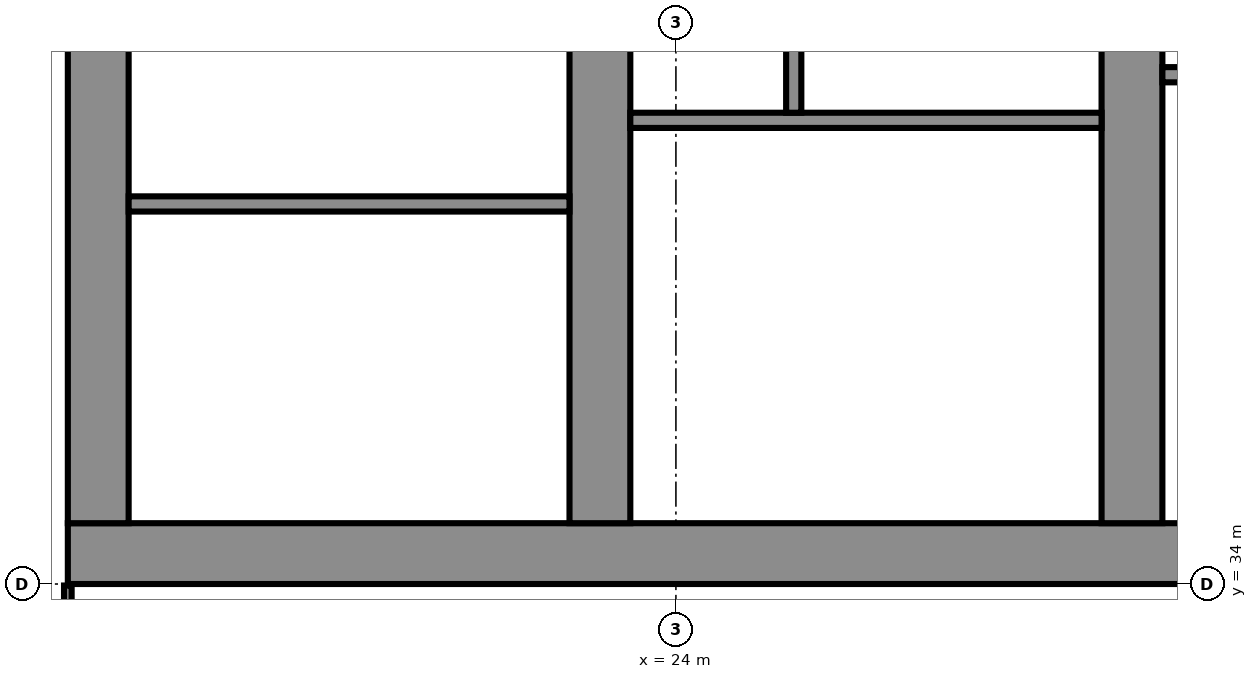
"""IFC4 building model, lengths in metres.
Left out: names, types, materials, properties, quantities, classifications, styles, units other than length and angle.
Written with IfcOpenShell. Run it as: python <this file> out.ifc"""

import sys

from ifc_helpers import new_model, si_unit, direction, frame, frame_2d, origin, place, context, subcontext, project, spatial, polyline, rectangle, outline, extrude, element, fill, save


model = new_model("IFC4")
c1 = context("Model", 3, precision=1e-05, world=origin(), true_north=direction((0.0, 1.0)))
c2 = subcontext(c1, "Body", "Model", "MODEL_VIEW")
j1 = project(units=[si_unit("LENGTHUNIT", "METRE"), si_unit("PLANEANGLEUNIT", "RADIAN")], contexts=[c1])
p1 = place(None, origin())
s1 = spatial("IfcSite", under=j1, at=p1, CompositionType="ELEMENT")
p2 = place(p1, origin())
s2 = spatial("IfcBuilding", under=s1, at=p2, CompositionType="ELEMENT")
p3 = place(p2, frame((0.0, 0.0, 151.9)))
s3 = spatial("IfcBuildingStorey", under=s2, at=p3, CompositionType="ELEMENT", Elevation=151.9)
p4 = place(p3, frame((16.0, 34.4, 0.0), z_axis=(0.0, 0.0, 1.0), x_axis=(1.0, 0.0, 0.0)))
e1 = element("IfcWall", 1, at=p4, inside=s3, PredefinedType="SHEAR", context=c2, shape_type="SweptSolid", body=[
    extrude(rectangle(XDim=42.0, YDim=0.8, at=frame_2d((21.0, 0.0))), origin(), (0.0, 0.0, 1.0), 3.6),
])
p5 = place(p4, frame((3.2, 0.0, 0.0)))
e2 = element("IfcOpeningElement", 2, at=p5, cuts=e1, PredefinedType="OPENING", context=c2, shape_type="SweptSolid", body=[
    extrude(rectangle(XDim=1.0, YDim=2.1, at=frame_2d((0.5, 1.05))), frame((0.0, 0.41, 0.0), z_axis=(0.0, -1.0, 0.0), x_axis=(1.0, 0.0, 0.0)), (0.0, 0.0, 1.0), 0.82),
])
p6 = place(p4, frame((7.65, 0.0, 0.0)))
e3 = element("IfcOpeningElement", 3, at=p6, cuts=e1, PredefinedType="OPENING", context=c2, shape_type="SweptSolid", body=[
    extrude(rectangle(XDim=1.2, YDim=2.1, at=frame_2d((0.6, 1.05))), frame((0.0, 0.41, 0.0), z_axis=(0.0, -1.0, 0.0), x_axis=(1.0, 0.0, 0.0)), (0.0, 0.0, 1.0), 0.82),
])
p7 = place(p4, frame((14.767, 0.0, 0.0)))
e4 = element("IfcOpeningElement", 4, at=p7, cuts=e1, PredefinedType="OPENING", context=c2, shape_type="SweptSolid", body=[
    extrude(rectangle(XDim=1.1, YDim=2.1, at=frame_2d((0.55, 1.05))), frame((0.0, 0.41, 0.0), z_axis=(0.0, -1.0, 0.0), x_axis=(1.0, 0.0, 0.0)), (0.0, 0.0, 1.0), 0.82),
])
p8 = place(p4, frame((19.133, 0.0, 0.0)))
e5 = element("IfcOpeningElement", 5, at=p8, cuts=e1, PredefinedType="OPENING", context=c2, shape_type="SweptSolid", body=[
    extrude(rectangle(XDim=1.1, YDim=2.1, at=frame_2d((0.55, 1.05))), frame((0.0, 0.41, 0.0), z_axis=(0.0, -1.0, 0.0), x_axis=(1.0, 0.0, 0.0)), (0.0, 0.0, 1.0), 0.82),
])
p9 = place(p4, frame((16.8, 0.0, 0.0)))
e6 = element("IfcOpeningElement", 6, at=p9, cuts=e1, PredefinedType="OPENING", context=c2, shape_type="SweptSolid", body=[
    extrude(rectangle(XDim=1.4, YDim=2.1, at=frame_2d((0.7, 1.05))), frame((0.0, 0.41, 0.0), z_axis=(0.0, -1.0, 0.0), x_axis=(1.0, 0.0, 0.0)), (0.0, 0.0, 1.0), 0.82),
])
p10 = place(p4, frame((21.767, 0.0, 0.0)))
e7 = element("IfcOpeningElement", 7, at=p10, cuts=e1, PredefinedType="OPENING", context=c2, shape_type="SweptSolid", body=[
    extrude(rectangle(XDim=1.1, YDim=2.1, at=frame_2d((0.55, 1.05))), frame((0.0, 0.41, 0.0), z_axis=(0.0, -1.0, 0.0), x_axis=(1.0, 0.0, 0.0)), (0.0, 0.0, 1.0), 0.82),
])
p11 = place(p4, frame((23.95, 0.0, 0.0)))
e8 = element("IfcOpeningElement", 8, at=p11, cuts=e1, PredefinedType="OPENING", context=c2, shape_type="SweptSolid", body=[
    extrude(rectangle(XDim=1.1, YDim=2.1, at=frame_2d((0.55, 1.05))), frame((0.0, 0.41, 0.0), z_axis=(0.0, -1.0, 0.0), x_axis=(1.0, 0.0, 0.0)), (0.0, 0.0, 1.0), 0.82),
])
p12 = place(p4, frame((26.133, 0.0, 0.0)))
e9 = element("IfcOpeningElement", 9, at=p12, cuts=e1, PredefinedType="OPENING", context=c2, shape_type="SweptSolid", body=[
    extrude(rectangle(XDim=1.1, YDim=2.1, at=frame_2d((0.55, 1.05))), frame((0.0, 0.41, 0.0), z_axis=(0.0, -1.0, 0.0), x_axis=(1.0, 0.0, 0.0)), (0.0, 0.0, 1.0), 0.82),
])
p13 = place(p4, frame((33.15, 0.0, 0.0)))
e10 = element("IfcOpeningElement", 10, at=p13, cuts=e1, PredefinedType="OPENING", context=c2, shape_type="SweptSolid", body=[
    extrude(rectangle(XDim=1.2, YDim=2.1, at=frame_2d((0.6, 1.05))), frame((0.0, 0.41, 0.0), z_axis=(0.0, -1.0, 0.0), x_axis=(1.0, 0.0, 0.0)), (0.0, 0.0, 1.0), 0.82),
])
p14 = place(p4, frame((35.817, 0.0, 0.0)))
e11 = element("IfcOpeningElement", 11, at=p14, cuts=e1, PredefinedType="OPENING", context=c2, shape_type="SweptSolid", body=[
    extrude(rectangle(XDim=1.0, YDim=2.1, at=frame_2d((0.5, 1.05))), frame((0.0, 0.41, 0.0), z_axis=(0.0, -1.0, 0.0), x_axis=(1.0, 0.0, 0.0)), (0.0, 0.0, 1.0), 0.82),
])
p15 = place(p4, frame((39.95, 0.0, 0.0)))
e12 = element("IfcOpeningElement", 12, at=p15, cuts=e1, PredefinedType="OPENING", context=c2, shape_type="SweptSolid", body=[
    extrude(rectangle(XDim=1.0, YDim=2.1, at=frame_2d((0.5, 1.05))), frame((0.0, 0.41, 0.0), z_axis=(0.0, -1.0, 0.0), x_axis=(1.0, 0.0, 0.0)), (0.0, 0.0, 1.0), 0.82),
])
p16 = place(p4, frame((37.767, 0.0, 0.0)))
e13 = element("IfcOpeningElement", 13, at=p16, cuts=e1, PredefinedType="OPENING", context=c2, shape_type="SweptSolid", body=[
    extrude(rectangle(XDim=1.4, YDim=2.1, at=frame_2d((0.7, 1.05))), frame((0.0, 0.41, 0.0), z_axis=(0.0, -1.0, 0.0), x_axis=(1.0, 0.0, 0.0)), (0.0, 0.0, 1.0), 0.82),
])
p17 = place(p3, frame((16.4, 34.8, 0.0), z_axis=(0.0, 0.0, 1.0), x_axis=(0.0, 1.0, 0.0)))
e14 = element("IfcWall", 14, at=p17, inside=s3, PredefinedType="SHEAR", context=c2, shape_type="SweptSolid", body=[
    extrude(rectangle(XDim=13.184, YDim=0.8, at=frame_2d((6.592, 0.0))), origin(), (0.0, 0.0, 1.0), 3.6),
])
p18 = place(p3, frame((23.0, 34.8, 0.0), z_axis=(0.0, 0.0, 1.0), x_axis=(0.0, 1.0, 0.0)))
e15 = element("IfcWall", 15, at=p18, inside=s3, PredefinedType="SHEAR", context=c2, shape_type="SweptSolid", body=[
    extrude(rectangle(XDim=13.762, YDim=0.8, at=frame_2d((6.881, 0.0))), origin(), (0.0, 0.0, 1.0), 3.6),
])
p19 = place(p18, frame((2.55, 0.0, 0.0)))
e16 = element("IfcOpeningElement", 16, at=p19, cuts=e15, PredefinedType="OPENING", context=c2, shape_type="SweptSolid", body=[
    extrude(rectangle(XDim=1.1, YDim=2.1, at=frame_2d((0.55, 1.05))), frame((0.0, 0.41, 0.0), z_axis=(0.0, -1.0, 0.0), x_axis=(1.0, 0.0, 0.0)), (0.0, 0.0, 1.0), 0.82),
])
p20 = place(p18, frame((10.0, 0.0, 0.0)))
e17 = element("IfcOpeningElement", 17, at=p20, cuts=e15, PredefinedType="OPENING", context=c2, shape_type="SweptSolid", body=[
    extrude(rectangle(XDim=1.0, YDim=2.1, at=frame_2d((0.5, 1.05))), frame((0.0, 0.41, 0.0), z_axis=(0.0, -1.0, 0.0), x_axis=(1.0, 0.0, 0.0)), (0.0, 0.0, 1.0), 0.82),
])
p21 = place(p3, frame((30.0, 34.8, 0.0), z_axis=(0.0, 0.0, 1.0), x_axis=(0.0, 1.0, 0.0)))
e18 = element("IfcWall", 18, at=p21, inside=s3, PredefinedType="SHEAR", context=c2, shape_type="SweptSolid", body=[
    extrude(rectangle(XDim=14.374, YDim=0.8, at=frame_2d((7.187, 0.0))), origin(), (0.0, 0.0, 1.0), 3.6),
])
p22 = place(p21, frame((3.6, 0.0, 0.0)))
e19 = element("IfcOpeningElement", 19, at=p22, cuts=e18, PredefinedType="OPENING", context=c2, shape_type="SweptSolid", body=[
    extrude(rectangle(XDim=1.1, YDim=2.1, at=frame_2d((0.55, 1.05))), frame((0.0, 0.41, 0.0), z_axis=(0.0, -1.0, 0.0), x_axis=(1.0, 0.0, 0.0)), (0.0, 0.0, 1.0), 0.82),
])
p23 = place(p3, frame((16.8, 39.0, 0.0), z_axis=(0.0, 0.0, 1.0), x_axis=(1.0, 0.0, 0.0)))
e20 = element("IfcWall", 20, at=p23, inside=s3, PredefinedType="PARTITIONING", context=c2, shape_type="SweptSolid", body=[
    extrude(rectangle(XDim=5.8, YDim=0.2, at=frame_2d((2.9, 0.0))), origin(), (0.0, 0.0, 1.0), 3.2),
])
p24 = place(p23, frame((2.4, 0.0, 0.0)))
e21 = element("IfcOpeningElement", 21, at=p24, cuts=e20, PredefinedType="OPENING", context=c2, shape_type="SweptSolid", body=[
    extrude(rectangle(XDim=1.0, YDim=2.1, at=frame_2d((0.5, 1.05))), frame((0.0, 0.11, 0.0), z_axis=(0.0, -1.0, 0.0), x_axis=(1.0, 0.0, 0.0)), (0.0, 0.0, 1.0), 0.22),
])
p25 = place(p3, frame((23.4, 40.1, 0.0), z_axis=(0.0, 0.0, 1.0), x_axis=(1.0, 0.0, 0.0)))
e22 = element("IfcWall", 22, at=p25, inside=s3, PredefinedType="SHEAR", context=c2, shape_type="SweptSolid", body=[
    extrude(rectangle(XDim=6.2, YDim=0.2, at=frame_2d((3.1, 0.0))), origin(), (0.0, 0.0, 1.0), 3.2),
])
p26 = place(p25, frame((3.525, 0.0, 0.0)))
e23 = element("IfcOpeningElement", 23, at=p26, cuts=e22, PredefinedType="OPENING", context=c2, shape_type="SweptSolid", body=[
    extrude(rectangle(XDim=1.2, YDim=2.1, at=frame_2d((0.6, 1.05))), frame((0.0, 0.11, 0.0), z_axis=(0.0, -1.0, 0.0), x_axis=(1.0, 0.0, 0.0)), (0.0, 0.0, 1.0), 0.22),
])
p27 = place(p25, frame((0.575, 0.0, 0.0)))
e24 = element("IfcOpeningElement", 24, at=p27, cuts=e22, PredefinedType="OPENING", context=c2, shape_type="SweptSolid", body=[
    extrude(rectangle(XDim=0.9, YDim=2.1, at=frame_2d((0.45, 1.05))), frame((0.0, 0.11, 0.0), z_axis=(0.0, -1.0, 0.0), x_axis=(1.0, 0.0, 0.0)), (0.0, 0.0, 1.0), 0.22),
])
p28 = place(p3, frame((25.55, 40.2, 0.0), z_axis=(0.0, 0.0, 1.0), x_axis=(0.0, 1.0, 0.0)))
e25 = element("IfcWall", 25, at=p28, inside=s3, PredefinedType="SHEAR", context=c2, shape_type="SweptSolid", body=[
    extrude(rectangle(XDim=7.2, YDim=0.2, at=frame_2d((3.6, 0.0))), origin(), (0.0, 0.0, 1.0), 3.2),
])
p29 = place(p3, frame((30.4, 40.7, 0.0), z_axis=(0.0, 0.0, 1.0), x_axis=(1.0, 0.0, 0.0)))
e26 = element("IfcWall", 26, at=p29, inside=s3, PredefinedType="PARTITIONING", context=c2, shape_type="SweptSolid", body=[
    extrude(rectangle(XDim=6.2, YDim=0.2, at=frame_2d((3.1, 0.0))), origin(), (0.0, 0.0, 1.0), 3.2),
])
p30 = place(p29, frame((0.367, 0.0, 0.0)))
e27 = element("IfcOpeningElement", 27, at=p30, cuts=e26, PredefinedType="OPENING", context=c2, shape_type="SweptSolid", body=[
    extrude(rectangle(XDim=1.1, YDim=2.1, at=frame_2d((0.55, 1.05))), frame((0.0, 0.11, 0.0), z_axis=(0.0, -1.0, 0.0), x_axis=(1.0, 0.0, 0.0)), (0.0, 0.0, 1.0), 0.22),
])
p31 = place(p29, frame((2.55, 0.0, 0.0)))
e28 = element("IfcOpeningElement", 28, at=p31, cuts=e26, PredefinedType="OPENING", context=c2, shape_type="SweptSolid", body=[
    extrude(rectangle(XDim=1.1, YDim=2.1, at=frame_2d((0.55, 1.05))), frame((0.0, 0.11, 0.0), z_axis=(0.0, -1.0, 0.0), x_axis=(1.0, 0.0, 0.0)), (0.0, 0.0, 1.0), 0.22),
])
p32 = place(p29, frame((4.733, 0.0, 0.0)))
e29 = element("IfcOpeningElement", 29, at=p32, cuts=e26, PredefinedType="OPENING", context=c2, shape_type="SweptSolid", body=[
    extrude(rectangle(XDim=1.1, YDim=2.1, at=frame_2d((0.55, 1.05))), frame((0.0, 0.11, 0.0), z_axis=(0.0, -1.0, 0.0), x_axis=(1.0, 0.0, 0.0)), (0.0, 0.0, 1.0), 0.22),
])
p33 = place(p3, origin())
e30 = element("IfcWall", 30, at=p33, inside=s3, PredefinedType="PARTITIONING", context=c2, shape_type="SweptSolid", body=[
    extrude(outline(polyline([(32.233, 37.65), (30.4, 37.65), (30.4, 37.85), (32.233, 37.85), (32.433, 37.85), (32.433, 34.8), (32.233, 34.8), (32.233, 37.65)])), origin(), (0.0, 0.0, 1.0), 3.2),
])
p34 = place(p3, origin())
e31 = element("IfcWall", 31, at=p34, inside=s3, PredefinedType="PARTITIONING", context=c2, shape_type="SweptSolid", body=[
    extrude(outline(polyline([(32.433, 40.8), (32.233, 40.8), (32.233, 43.8), (30.4, 43.8), (30.4, 44.0), (36.6, 44.0), (36.6, 43.8), (34.767, 43.8), (34.767, 40.8), (34.567, 40.8), (34.567, 43.8), (32.433, 43.8), (32.433, 40.8)])), origin(), (0.0, 0.0, 1.0), 3.2),
])
p35 = place(p3, frame((16.0, 26.42, 0.0), z_axis=(0.0, 0.0, 1.0), x_axis=(0.0, 1.0, 0.0)))
e32 = element("IfcWall", 32, at=p35, inside=s3, PredefinedType="PARTITIONING", context=c2, shape_type="SweptSolid", body=[
    extrude(rectangle(XDim=7.56, YDim=0.1, at=frame_2d((3.78, 0.0))), origin(), (0.0, 0.0, 1.0), 3.2),
])
p36 = place(p35, frame((2.96, 0.0, 0.0)))
e33 = element("IfcOpeningElement", 33, at=p36, cuts=e32, PredefinedType="OPENING", context=c2, shape_type="SweptSolid", body=[
    extrude(rectangle(XDim=1.8, YDim=2.1, at=frame_2d((0.9, 1.05))), frame((0.0, 0.06, 0.0), z_axis=(0.0, -1.0, 0.0), x_axis=(1.0, 0.0, 0.0)), (0.0, 0.0, 1.0), 0.12),
])
p37 = place(p5, origin())
e34 = element("IfcDoor", 34, at=p37, inside=s3, OperationType="SINGLE_SWING_LEFT", PredefinedType="DOOR", context=c2, shape_type="SweptSolid", body=[
    extrude(rectangle(XDim=1.0, YDim=2.1, at=frame_2d((0.5, 1.05))), frame((0.0, 0.4, 0.0), z_axis=(0.0, -1.0, 0.0), x_axis=(1.0, 0.0, 0.0)), (0.0, 0.0, 1.0), 0.8),
])
fill(e2, e34)
p38 = place(p24, origin())
e35 = element("IfcDoor", 35, at=p38, inside=s3, OperationType="SINGLE_SWING_RIGHT", PredefinedType="DOOR", context=c2, shape_type="SweptSolid", body=[
    extrude(rectangle(XDim=1.0, YDim=2.1, at=frame_2d((0.5, 1.05))), frame((0.0, 0.025, 0.0), z_axis=(0.0, -1.0, 0.0), x_axis=(1.0, 0.0, 0.0)), (0.0, 0.0, 1.0), 0.05),
])
fill(e21, e35)
p39 = place(p26, origin())
e36 = element("IfcDoor", 36, at=p39, inside=s3, OperationType="SINGLE_SWING_RIGHT", PredefinedType="DOOR", context=c2, shape_type="SweptSolid", body=[
    extrude(rectangle(XDim=1.2, YDim=2.1, at=frame_2d((0.6, 1.05))), frame((0.0, 0.025, 0.0), z_axis=(0.0, -1.0, 0.0), x_axis=(1.0, 0.0, 0.0)), (0.0, 0.0, 1.0), 0.05),
])
fill(e23, e36)
p40 = place(p27, origin())
e37 = element("IfcDoor", 37, at=p40, inside=s3, OperationType="SINGLE_SWING_LEFT", PredefinedType="DOOR", context=c2, shape_type="SweptSolid", body=[
    extrude(rectangle(XDim=0.9, YDim=2.1, at=frame_2d((0.45, 1.05))), frame((0.0, 0.025, 0.0), z_axis=(0.0, -1.0, 0.0), x_axis=(1.0, 0.0, 0.0)), (0.0, 0.0, 1.0), 0.05),
])
fill(e24, e37)
p41 = place(p6, origin())
e38 = element("IfcDoor", 38, at=p41, inside=s3, OperationType="SINGLE_SWING_LEFT", PredefinedType="DOOR", context=c2, shape_type="SweptSolid", body=[
    extrude(rectangle(XDim=1.2, YDim=2.1, at=frame_2d((0.6, 1.05))), frame((0.0, 0.025, 0.0), z_axis=(0.0, -1.0, 0.0), x_axis=(1.0, 0.0, 0.0)), (0.0, 0.0, 1.0), 0.05),
])
fill(e3, e38)
p42 = place(p19, origin())
e39 = element("IfcDoor", 39, at=p42, inside=s3, OperationType="SINGLE_SWING_RIGHT", PredefinedType="DOOR", context=c2, shape_type="SweptSolid", body=[
    extrude(rectangle(XDim=1.1, YDim=2.1, at=frame_2d((0.55, 1.05))), frame((0.0, 0.025, 0.0), z_axis=(0.0, -1.0, 0.0), x_axis=(1.0, 0.0, 0.0)), (0.0, 0.0, 1.0), 0.05),
])
fill(e16, e39)
p43 = place(p22, origin())
e40 = element("IfcDoor", 40, at=p43, inside=s3, OperationType="SINGLE_SWING_LEFT", PredefinedType="DOOR", context=c2, shape_type="SweptSolid", body=[
    extrude(rectangle(XDim=1.1, YDim=2.1, at=frame_2d((0.55, 1.05))), frame((0.0, 0.025, 0.0), z_axis=(0.0, -1.0, 0.0), x_axis=(1.0, 0.0, 0.0)), (0.0, 0.0, 1.0), 0.05),
])
fill(e19, e40)
save(model, sys.argv[1])
